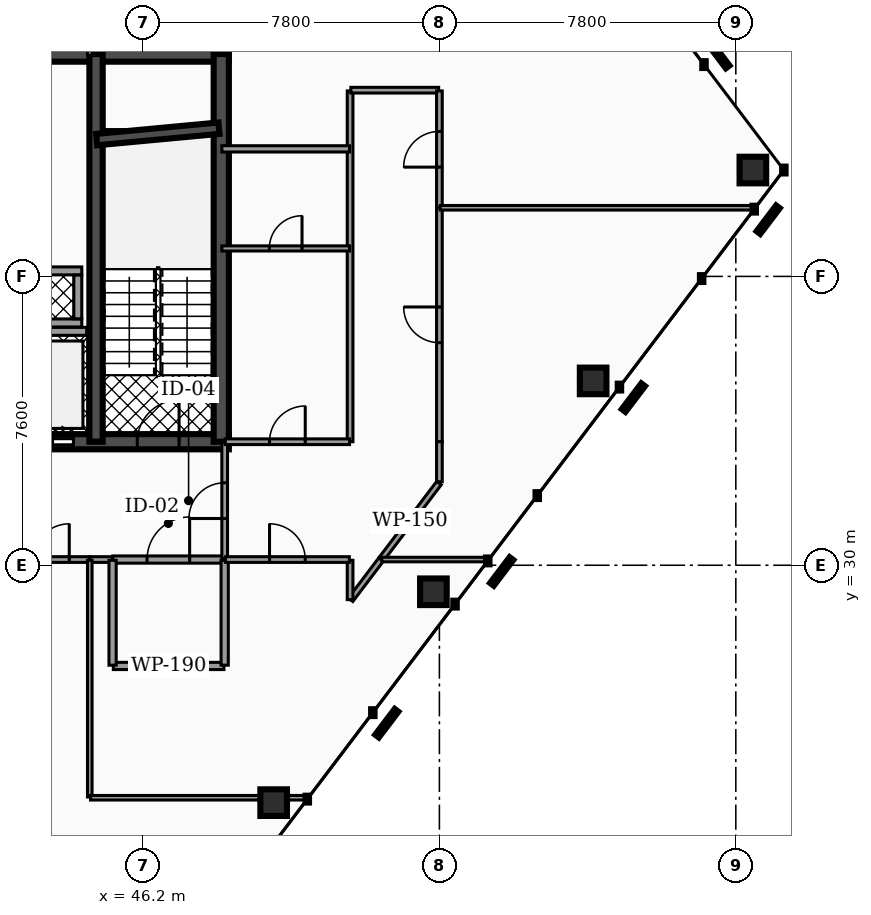
"""IFC4 building model, lengths in metres.
Left out: names, types, materials, properties, quantities, classifications, styles, units other than length and angle.
Written with IfcOpenShell. Run it as: python <this file> out.ifc"""

import sys

from ifc_helpers import new_model, si_unit, direction, frame, frame_2d, origin, origin_2d, place, context, subcontext, project, spatial, rectangle, hollow_rectangle, extrude, element, fill, save


model = new_model("IFC4")
c1 = context("Model", 3, precision=1e-05, world=origin(), true_north=direction((0.0, 1.0)))
c2 = subcontext(c1, "Body", "Model", "MODEL_VIEW")
j1 = project(units=[si_unit("LENGTHUNIT", "METRE"), si_unit("PLANEANGLEUNIT", "RADIAN")], contexts=[c1])
p1 = place(None, origin())
s1 = spatial("IfcSite", under=j1, at=p1, CompositionType="ELEMENT")
p2 = place(p1, origin())
s2 = spatial("IfcBuilding", under=s1, at=p2, CompositionType="ELEMENT")
p3 = place(p2, frame((0.0, 0.0, 179.52)))
s3 = spatial("IfcBuildingStorey", under=s2, at=p3, CompositionType="ELEMENT", Elevation=179.52)
p4 = place(p3, frame((28.4, 43.45, 0.0), z_axis=(0.0, 0.0, 1.0), x_axis=(1.0, 0.0, 0.0)))
e1 = element("IfcWall", 1, at=p4, inside=s3, PredefinedType="SHEAR", context=c2, shape_type="SweptSolid", body=[
    extrude(rectangle(XDim=20.06, YDim=0.4, at=frame_2d((10.03, 0.0))), origin(), (0.0, 0.0, 1.0), 3.5),
])
p5 = place(p3, frame((28.4, 33.25, 0.0), z_axis=(0.0, 0.0, 1.0), x_axis=(1.0, 0.0, 0.0)))
e2 = element("IfcWall", 2, at=p5, inside=s3, PredefinedType="SHEAR", context=c2, shape_type="SweptSolid", body=[
    extrude(rectangle(XDim=20.06, YDim=0.4, at=frame_2d((10.03, 0.0))), origin(), (0.0, 0.0, 1.0), 3.5),
])
p6 = place(p5, frame((4.03, 0.0, 0.0)))
e3 = element("IfcOpeningElement", 3, at=p6, cuts=e2, PredefinedType="OPENING", context=c2, shape_type="SweptSolid", body=[
    extrude(rectangle(XDim=1.1, YDim=2.15, at=frame_2d((0.55, 1.075))), frame((0.0, 0.21, 0.0), z_axis=(0.0, -1.0, 0.0), x_axis=(1.0, 0.0, 0.0)), (0.0, 0.0, 1.0), 0.42),
])
p7 = place(p5, frame((14.87, 0.0, 0.0)))
e4 = element("IfcOpeningElement", 4, at=p7, cuts=e2, PredefinedType="OPENING", context=c2, shape_type="SweptSolid", body=[
    extrude(rectangle(XDim=1.1, YDim=2.15, at=frame_2d((0.55, 1.075))), frame((0.0, 0.21, 0.0), z_axis=(0.0, -1.0, 0.0), x_axis=(1.0, 0.0, 0.0)), (0.0, 0.0, 1.0), 0.42),
])
p8 = place(p5, frame((5.95, 0.0, 0.0)))
e5 = element("IfcOpeningElement", 5, at=p8, cuts=e2, PredefinedType="OPENING", context=c2, shape_type="SweptSolid", body=[
    extrude(rectangle(XDim=1.0, YDim=2.1, at=frame_2d((0.5, 1.05))), frame((0.0, 0.21, 0.0), z_axis=(0.0, -1.0, 0.0), x_axis=(1.0, 0.0, 0.0)), (0.0, 0.0, 1.0), 0.42),
])
p9 = place(p5, frame((7.65, 0.0, 0.0)))
e6 = element("IfcOpeningElement", 6, at=p9, cuts=e2, PredefinedType="OPENING", context=c2, shape_type="SweptSolid", body=[
    extrude(rectangle(XDim=1.0, YDim=2.1, at=frame_2d((0.5, 1.05))), frame((0.0, 0.21, 0.0), z_axis=(0.0, -1.0, 0.0), x_axis=(1.0, 0.0, 0.0)), (0.0, 0.0, 1.0), 0.42),
])
p10 = place(p5, frame((1.31, 0.0, 0.0)))
e7 = element("IfcOpeningElement", 7, at=p10, cuts=e2, PredefinedType="OPENING", context=c2, shape_type="SweptSolid", body=[
    extrude(rectangle(XDim=1.1, YDim=2.2, at=frame_2d((0.55, 1.1))), frame((0.0, 0.21, 0.0), z_axis=(0.0, -1.0, 0.0), x_axis=(1.0, 0.0, 0.0)), (0.0, 0.0, 1.0), 0.42),
])
p11 = place(p5, frame((9.44, 0.0, 0.0)))
e8 = element("IfcOpeningElement", 8, at=p11, cuts=e2, PredefinedType="OPENING", context=c2, shape_type="SweptSolid", body=[
    extrude(rectangle(XDim=1.12, YDim=2.05, at=frame_2d((0.56, 1.025))), frame((0.0, 0.21, 0.0), z_axis=(0.0, -1.0, 0.0), x_axis=(1.0, 0.0, 0.0)), (0.0, 0.0, 1.0), 0.42),
])
p12 = place(p5, frame((17.65, 0.0, 0.0)))
e9 = element("IfcOpeningElement", 9, at=p12, cuts=e2, PredefinedType="OPENING", context=c2, shape_type="SweptSolid", body=[
    extrude(rectangle(XDim=1.1, YDim=2.2, at=frame_2d((0.55, 1.1))), frame((0.0, 0.21, 0.0), z_axis=(0.0, -1.0, 0.0), x_axis=(1.0, 0.0, 0.0)), (0.0, 0.0, 1.0), 0.42),
])
p13 = place(p3, frame((44.965, 33.25, 0.0), z_axis=(0.0, 0.0, 1.0), x_axis=(0.0, 1.0, 0.0)))
e10 = element("IfcWall", 10, at=p13, inside=s3, PredefinedType="SHEAR", context=c2, shape_type="SweptSolid", body=[
    extrude(rectangle(XDim=10.2, YDim=0.35, at=frame_2d((5.1, 0.0))), origin(), (0.0, 0.0, 1.0), 3.5),
])
p14 = place(p3, frame((48.26, 33.25, 0.0), z_axis=(0.0, 0.0, 1.0), x_axis=(0.0, 1.0, 0.0)))
e11 = element("IfcWall", 11, at=p14, inside=s3, PredefinedType="SHEAR", context=c2, shape_type="SweptSolid", body=[
    extrude(rectangle(XDim=10.2, YDim=0.4, at=frame_2d((5.1, 0.0))), origin(), (0.0, 0.0, 1.0), 3.5),
])
p15 = place(p3, frame((44.98, 41.2, 0.0), z_axis=(0.0, 0.0, 1.0), x_axis=(0.995686468965, 0.09278176286, 0.0)))
e12 = element("IfcWall", 12, at=p15, inside=s3, PredefinedType="SHEAR", context=c2, shape_type="SweptSolid", body=[
    extrude(rectangle(XDim=3.234, YDim=0.3, at=frame_2d((1.617, 0.0))), origin(), (0.0, 0.0, 1.0), 3.5),
])
for number, where, z_axis, x_axis in (
    (13, (49.639, 23.754, 0.0), (0.0, 0.0, 1.0), (1.0, 0.0, 0.0)),
    (14, (53.842, 29.302, 0.0), (0.0, 0.0, 1.0), (1.0, 0.0, 0.0)),
    (15, (58.045, 34.851, 0.0), (0.0, 0.0, 1.0), (1.0, 0.0, 0.0)),
    (16, (62.249, 40.399, 0.0), (0.0, 0.0, 1.0), (1.0, 0.0, 0.0)),
):
    element("IfcColumn", number, at=place(p3, frame(where, z_axis=z_axis, x_axis=x_axis)), inside=s3, PredefinedType="COLUMN", context=c2, shape_type="SweptSolid", body=[
        extrude(hollow_rectangle(XDim=0.7, YDim=0.7, WallThickness=0.035, at=origin_2d()), origin(), (0.0, 0.0, 1.0), 3.5),
    ])
p16 = place(p3, frame((42.92, 36.155, 0.0), z_axis=(0.0, 0.0, 1.0), x_axis=(1.0, 0.0, 0.0)))
e17 = element("IfcWall", 17, at=p16, inside=s3, PredefinedType="SOLIDWALL", context=c2, shape_type="SweptSolid", body=[
    extrude(rectangle(XDim=1.8, YDim=0.21, at=frame_2d((0.9, 0.0))), origin(), (0.0, 0.0, 1.0), 2.472),
])
for number, where, z_axis, x_axis in (
    (18, (42.99, 36.375, 0.0), (0.0, 0.0, 1.0), (1.0, 0.0, 0.0)),
    (19, (42.99, 37.745, 0.0), (0.0, 0.0, 1.0), (1.0, 0.0, 0.0)),
):
    element("IfcWall", number, at=place(p3, frame(where, z_axis=z_axis, x_axis=x_axis)), inside=s3, PredefinedType="SOLIDWALL", context=c2, shape_type="SweptSolid", body=[
        extrude(rectangle(XDim=1.6, YDim=0.21, at=frame_2d((0.8, 0.0))), origin(), (0.0, 0.0, 1.0), 3.5),
    ])
p17 = place(p3, frame((44.485, 36.485, 0.0), z_axis=(0.0, 0.0, 1.0), x_axis=(0.0, 1.0, 0.0)))
e20 = element("IfcWall", 20, at=p17, inside=s3, PredefinedType="SOLIDWALL", context=c2, shape_type="SweptSolid", body=[
    extrude(rectangle(XDim=1.15, YDim=0.21, at=frame_2d((0.575, 0.0))), origin(), (0.0, 0.0, 1.0), 3.5),
])
p18 = place(p3, frame((45.405, 30.15, 0.0), z_axis=(0.0, 0.0, 1.0), x_axis=(1.0, 0.0, 0.0)))
e21 = element("IfcWall", 21, at=p18, inside=s3, PredefinedType="PARTITIONING", context=c2, shape_type="SweptSolid", body=[
    extrude(rectangle(XDim=2.925, YDim=0.19, at=frame_2d((1.462, 0.0))), origin(), (0.0, 0.0, 1.0), 2.457),
])
p19 = place(p18, frame((0.903, 0.0, 0.0)))
e22 = element("IfcOpeningElement", 22, at=p19, cuts=e21, PredefinedType="OPENING", context=c2, shape_type="SweptSolid", body=[
    extrude(rectangle(XDim=1.12, YDim=2.05, at=frame_2d((0.56, 1.025))), frame((0.0, 0.105, 0.0), z_axis=(0.0, -1.0, 0.0), x_axis=(1.0, 0.0, 0.0)), (0.0, 0.0, 1.0), 0.21),
])
p20 = place(p3, frame((48.35, 30.17, 0.0), z_axis=(0.0, 0.0, 1.0), x_axis=(0.0, 1.0, 0.0)))
e23 = element("IfcWall", 23, at=p20, inside=s3, PredefinedType="PARTITIONING", context=c2, shape_type="SweptSolid", body=[
    extrude(rectangle(XDim=3.06, YDim=0.15, at=frame_2d((1.53, 0.0))), origin(), (0.0, 0.0, 1.0), 2.457),
])
p21 = place(p20, frame((1.06, 0.0, 0.0)))
e24 = element("IfcOpeningElement", 24, at=p21, cuts=e23, PredefinedType="OPENING", context=c2, shape_type="SweptSolid", body=[
    extrude(rectangle(XDim=0.94, YDim=2.05, at=frame_2d((0.47, 1.025))), frame((0.0, 0.085, 0.0), z_axis=(0.0, -1.0, 0.0), x_axis=(1.0, 0.0, 0.0)), (0.0, 0.0, 1.0), 0.17),
])
p22 = place(p3, frame((35.985, 30.15, 0.0), z_axis=(0.0, 0.0, 1.0), x_axis=(1.0, 0.0, 0.0)))
e25 = element("IfcWall", 25, at=p22, inside=s3, PredefinedType="PARTITIONING", context=c2, shape_type="SweptSolid", body=[
    extrude(rectangle(XDim=8.81, YDim=0.15, at=frame_2d((4.405, 0.0))), origin(), (0.0, 0.0, 1.0), 2.457),
])
p23 = place(p22, frame((7.335, 0.0, 0.0)))
e26 = element("IfcOpeningElement", 26, at=p23, cuts=e25, PredefinedType="OPENING", context=c2, shape_type="SweptSolid", body=[
    extrude(rectangle(XDim=0.94, YDim=2.05, at=frame_2d((0.47, 1.025))), frame((0.0, 0.085, 0.0), z_axis=(0.0, -1.0, 0.0), x_axis=(1.0, 0.0, 0.0)), (0.0, 0.0, 1.0), 0.17),
])
p24 = place(p3, frame((44.805, 30.15, 0.0), z_axis=(0.0, 0.0, 1.0), x_axis=(1.0, 0.0, 0.0)))
e27 = element("IfcWall", 27, at=p24, inside=s3, PredefinedType="PARTITIONING", context=c2, shape_type="SweptSolid", body=[
    extrude(rectangle(XDim=0.59, YDim=0.15, at=frame_2d((0.295, 0.0))), origin(), (0.0, 0.0, 1.0), 2.457),
])
p25 = place(p3, frame((45.42, 27.35, 0.0), z_axis=(0.0, 0.0, 1.0), x_axis=(1.0, 0.0, 0.0)))
e28 = element("IfcWall", 28, at=p25, inside=s3, PredefinedType="PARTITIONING", context=c2, shape_type="SweptSolid", body=[
    extrude(rectangle(XDim=2.91, YDim=0.19, at=frame_2d((1.455, 0.0))), origin(), (0.0, 0.0, 1.0), 2.457),
])
for number, where, z_axis, x_axis in (
    (29, (45.4, 27.37, 0.0), (0.0, 0.0, 1.0), (0.0, 1.0, 0.0)),
    (30, (48.35, 27.37, 0.0), (0.0, 0.0, 1.0), (0.0, 1.0, 0.0)),
):
    element("IfcWall", number, at=place(p3, frame(where, z_axis=z_axis, x_axis=x_axis)), inside=s3, PredefinedType="PARTITIONING", context=c2, shape_type="SweptSolid", body=[
        extrude(rectangle(XDim=2.76, YDim=0.19, at=frame_2d((1.38, 0.0))), origin(), (0.0, 0.0, 1.0), 2.457),
    ])
p26 = place(p3, frame((51.662, 29.091, 0.0), z_axis=(0.0, 0.0, 1.0), x_axis=(0.603847067363, 0.797100193976, 0.0)))
e31 = element("IfcWall", 31, at=p26, inside=s3, PredefinedType="PARTITIONING", context=c2, shape_type="SweptSolid", body=[
    extrude(rectangle(XDim=1.328, YDim=0.15, at=frame_2d((0.664, 0.0))), origin(), (0.0, 0.0, 1.0), 2.457),
])
p27 = place(p3, frame((51.65, 29.095, 0.0), z_axis=(0.0, 0.0, 1.0), x_axis=(0.0, 1.0, 0.0)))
e32 = element("IfcWall", 32, at=p27, inside=s3, PredefinedType="PARTITIONING", context=c2, shape_type="SweptSolid", body=[
    extrude(rectangle(XDim=1.035, YDim=0.15, at=frame_2d((0.518, 0.0))), origin(), (0.0, 0.0, 1.0), 2.457),
])
p28 = place(p3, frame((48.37, 30.15, 0.0), z_axis=(0.0, 0.0, 1.0), x_axis=(1.0, 0.0, 0.0)))
e33 = element("IfcWall", 33, at=p28, inside=s3, PredefinedType="PARTITIONING", context=c2, shape_type="SweptSolid", body=[
    extrude(rectangle(XDim=3.26, YDim=0.15, at=frame_2d((1.63, 0.0))), origin(), (0.0, 0.0, 1.0), 2.457),
])
p29 = place(p28, frame((1.16, 0.0, 0.0)))
e34 = element("IfcOpeningElement", 34, at=p29, cuts=e33, PredefinedType="OPENING", context=c2, shape_type="SweptSolid", body=[
    extrude(rectangle(XDim=0.94, YDim=2.05, at=frame_2d((0.47, 1.025))), frame((0.0, 0.085, 0.0), z_axis=(0.0, -1.0, 0.0), x_axis=(1.0, 0.0, 0.0)), (0.0, 0.0, 1.0), 0.17),
])
p30 = place(p3, frame((54.0, 33.25, 0.0), z_axis=(0.0, 0.0, 1.0), x_axis=(0.0, 1.0, 0.0)))
e35 = element("IfcWall", 35, at=p30, inside=s3, PredefinedType="PARTITIONING", context=c2, shape_type="SweptSolid", body=[
    extrude(rectangle(XDim=6.151, YDim=0.15, at=frame_2d((3.076, 0.0))), origin(), (0.0, 0.0, 1.0), 2.457),
])
p31 = place(p30, frame((2.606, 0.0, 0.0)))
e36 = element("IfcOpeningElement", 36, at=p31, cuts=e35, PredefinedType="OPENING", context=c2, shape_type="SweptSolid", body=[
    extrude(rectangle(XDim=0.94, YDim=2.05, at=frame_2d((0.47, 1.025))), frame((0.0, 0.085, 0.0), z_axis=(0.0, -1.0, 0.0), x_axis=(1.0, 0.0, 0.0)), (0.0, 0.0, 1.0), 0.17),
])
p32 = place(p3, frame((54.0, 32.197, 0.0), z_axis=(0.0, 0.0, 1.0), x_axis=(0.0, 1.0, 0.0)))
e37 = element("IfcWall", 37, at=p32, inside=s3, PredefinedType="PARTITIONING", context=c2, shape_type="SweptSolid", body=[
    extrude(rectangle(XDim=1.053, YDim=0.15, at=frame_2d((0.527, 0.0))), origin(), (0.0, 0.0, 1.0), 2.457),
])
p33 = place(p3, frame((52.468, 30.154, 0.0), z_axis=(0.0, 0.0, 1.0), x_axis=(0.603840884766, 0.797104877594, 0.0)))
e38 = element("IfcWall", 38, at=p33, inside=s3, PredefinedType="PARTITIONING", context=c2, shape_type="SweptSolid", body=[
    extrude(rectangle(XDim=2.518, YDim=0.15, at=frame_2d((1.259, 0.0))), origin(), (0.0, 0.0, 1.0), 2.457),
])
p34 = place(p3, frame((51.65, 33.25, 0.0), z_axis=(0.0, 0.0, 1.0), x_axis=(0.0, 1.0, 0.0)))
e39 = element("IfcWall", 39, at=p34, inside=s3, PredefinedType="PARTITIONING", context=c2, shape_type="SweptSolid", body=[
    extrude(rectangle(XDim=9.23, YDim=0.15, at=frame_2d((4.615, 0.0))), origin(), (0.0, 0.0, 1.0), 2.457),
])
p35 = place(p3, frame((51.67, 42.5, 0.0), z_axis=(0.0, 0.0, 1.0), x_axis=(1.0, 0.0, 0.0)))
e40 = element("IfcWall", 40, at=p35, inside=s3, PredefinedType="PARTITIONING", context=c2, shape_type="SweptSolid", body=[
    extrude(rectangle(XDim=2.31, YDim=0.15, at=frame_2d((1.155, 0.0))), origin(), (0.0, 0.0, 1.0), 2.457),
])
p36 = place(p3, frame((54.0, 39.411, 0.0), z_axis=(0.0, 0.0, 1.0), x_axis=(0.0, 1.0, 0.0)))
e41 = element("IfcWall", 41, at=p36, inside=s3, PredefinedType="PARTITIONING", context=c2, shape_type="SweptSolid", body=[
    extrude(rectangle(XDim=3.069, YDim=0.15, at=frame_2d((1.534, 0.0))), origin(), (0.0, 0.0, 1.0), 2.457),
])
p37 = place(p36, frame((1.064, 0.0, 0.0)))
e42 = element("IfcOpeningElement", 42, at=p37, cuts=e41, PredefinedType="OPENING", context=c2, shape_type="SweptSolid", body=[
    extrude(rectangle(XDim=0.94, YDim=2.05, at=frame_2d((0.47, 1.025))), frame((0.0, 0.085, 0.0), z_axis=(0.0, -1.0, 0.0), x_axis=(1.0, 0.0, 0.0)), (0.0, 0.0, 1.0), 0.17),
])
p38 = place(p3, frame((48.365, 33.25, 0.0), z_axis=(0.0, 0.0, 1.0), x_axis=(1.0, 0.0, 0.0)))
e43 = element("IfcWall", 43, at=p38, inside=s3, PredefinedType="PARTITIONING", context=c2, shape_type="SweptSolid", body=[
    extrude(rectangle(XDim=3.27, YDim=0.15, at=frame_2d((1.635, 0.0))), origin(), (0.0, 0.0, 1.0), 2.457),
])
p39 = place(p38, frame((1.165, 0.0, 0.0)))
e44 = element("IfcOpeningElement", 44, at=p39, cuts=e43, PredefinedType="OPENING", context=c2, shape_type="SweptSolid", body=[
    extrude(rectangle(XDim=0.94, YDim=2.05, at=frame_2d((0.47, 1.025))), frame((0.0, 0.085, 0.0), z_axis=(0.0, -1.0, 0.0), x_axis=(1.0, 0.0, 0.0)), (0.0, 0.0, 1.0), 0.17),
])
p40 = place(p3, frame((44.8, 23.903, 0.0), z_axis=(0.0, 0.0, 1.0), x_axis=(0.0, 1.0, 0.0)))
e45 = element("IfcWall", 45, at=p40, inside=s3, PredefinedType="PARTITIONING", context=c2, shape_type="SweptSolid", body=[
    extrude(rectangle(XDim=6.227, YDim=0.12, at=frame_2d((3.114, 0.0))), origin(), (0.0, 0.0, 1.0), 2.457),
])
p41 = place(p3, frame((44.82, 23.883, 0.0), z_axis=(0.0, 0.0, 1.0), x_axis=(1.0, 0.0, 0.0)))
e46 = element("IfcWall", 46, at=p41, inside=s3, PredefinedType="PARTITIONING", context=c2, shape_type="SweptSolid", body=[
    extrude(rectangle(XDim=5.717, YDim=0.12, at=frame_2d((2.858, 0.0))), origin(), (0.0, 0.0, 1.0), 2.457),
])
p42 = place(p3, frame((44.8, 43.415, 0.0), z_axis=(0.0, 0.0, 1.0), x_axis=(0.0, 1.0, 0.0)))
e47 = element("IfcWall", 47, at=p42, inside=s3, PredefinedType="PARTITIONING", context=c2, shape_type="SweptSolid", body=[
    extrude(rectangle(XDim=3.092, YDim=0.12, at=frame_2d((1.546, 0.0))), origin(), (0.0, 0.0, 1.0), 2.457),
])
p43 = place(p3, frame((52.485, 30.15, 0.0), z_axis=(0.0, 0.0, 1.0), x_axis=(1.0, 0.0, 0.0)))
e48 = element("IfcWall", 48, at=p43, inside=s3, PredefinedType="PARTITIONING", context=c2, shape_type="SweptSolid", body=[
    extrude(rectangle(XDim=2.8, YDim=0.12, at=frame_2d((1.4, 0.0))), origin(), (0.0, 0.0, 1.0), 2.457),
])
p44 = place(p3, frame((54.02, 39.406, 0.0), z_axis=(0.0, 0.0, 1.0), x_axis=(1.0, 0.0, 0.0)))
e49 = element("IfcWall", 49, at=p44, inside=s3, PredefinedType="PARTITIONING", context=c2, shape_type="SweptSolid", body=[
    extrude(rectangle(XDim=8.277, YDim=0.12, at=frame_2d((4.139, 0.0))), origin(), (0.0, 0.0, 1.0), 2.457),
])
p45 = place(p3, frame((48.275, 40.956, 0.0), z_axis=(0.0, 0.0, 1.0), x_axis=(1.0, 0.0, 0.0)))
e50 = element("IfcWall", 50, at=p45, inside=s3, PredefinedType="PARTITIONING", context=c2, shape_type="SweptSolid", body=[
    extrude(rectangle(XDim=3.36, YDim=0.165, at=frame_2d((1.68, 0.0))), origin(), (0.0, 0.0, 1.0), 2.457),
])
p46 = place(p3, frame((48.275, 38.336, 0.0), z_axis=(0.0, 0.0, 1.0), x_axis=(1.0, 0.0, 0.0)))
e51 = element("IfcWall", 51, at=p46, inside=s3, PredefinedType="PARTITIONING", context=c2, shape_type="SweptSolid", body=[
    extrude(rectangle(XDim=3.36, YDim=0.135, at=frame_2d((1.68, 0.0))), origin(), (0.0, 0.0, 1.0), 2.457),
])
p47 = place(p46, frame((1.25, 0.0, 0.0)))
e52 = element("IfcOpeningElement", 52, at=p47, cuts=e51, PredefinedType="OPENING", context=c2, shape_type="SweptSolid", body=[
    extrude(rectangle(XDim=0.86, YDim=2.05, at=frame_2d((0.43, 1.025))), frame((0.0, 0.077, 0.0), z_axis=(0.0, -1.0, 0.0), x_axis=(1.0, 0.0, 0.0)), (0.0, 0.0, 1.0), 0.155),
])
p48 = place(p7, origin())
e53 = element("IfcDoor", 53, at=p48, inside=s3, OperationType="SLIDING_TO_RIGHT", PredefinedType="DOOR", context=c2, shape_type="SweptSolid", body=[
    extrude(rectangle(XDim=1.1, YDim=2.15, at=frame_2d((0.55, 1.075))), frame((0.0, 0.025, 0.0), z_axis=(0.0, -1.0, 0.0), x_axis=(1.0, 0.0, 0.0)), (0.0, 0.0, 1.0), 0.05),
])
fill(e4, e53)
p49 = place(p12, origin())
e54 = element("IfcDoor", 54, at=p49, inside=s3, OperationType="SINGLE_SWING_RIGHT", PredefinedType="DOOR", context=c2, shape_type="SweptSolid", body=[
    extrude(rectangle(XDim=1.1, YDim=2.2, at=frame_2d((0.55, 1.1))), frame((0.0, 0.025, 0.0), z_axis=(0.0, -1.0, 0.0), x_axis=(1.0, 0.0, 0.0)), (0.0, 0.0, 1.0), 0.05),
])
fill(e9, e54)
p50 = place(p19, origin())
e55 = element("IfcDoor", 55, at=p50, inside=s3, OperationType="SINGLE_SWING_RIGHT", PredefinedType="DOOR", context=c2, shape_type="SweptSolid", body=[
    extrude(rectangle(XDim=1.12, YDim=2.05, at=frame_2d((0.56, 1.025))), frame((0.0, 0.025, 0.0), z_axis=(0.0, -1.0, 0.0), x_axis=(1.0, 0.0, 0.0)), (0.0, 0.0, 1.0), 0.05),
])
fill(e22, e55)
p51 = place(p21, origin())
e56 = element("IfcDoor", 56, at=p51, inside=s3, OperationType="SINGLE_SWING_LEFT", PredefinedType="DOOR", context=c2, shape_type="SweptSolid", body=[
    extrude(rectangle(XDim=0.94, YDim=2.05, at=frame_2d((0.47, 1.025))), frame((0.0, 0.025, 0.0), z_axis=(0.0, -1.0, 0.0), x_axis=(1.0, 0.0, 0.0)), (0.0, 0.0, 1.0), 0.05),
])
fill(e24, e56)
p52 = place(p23, origin())
e57 = element("IfcDoor", 57, at=p52, inside=s3, OperationType="SINGLE_SWING_RIGHT", PredefinedType="DOOR", context=c2, shape_type="SweptSolid", body=[
    extrude(rectangle(XDim=0.94, YDim=2.05, at=frame_2d((0.47, 1.025))), frame((0.0, 0.025, 0.0), z_axis=(0.0, -1.0, 0.0), x_axis=(1.0, 0.0, 0.0)), (0.0, 0.0, 1.0), 0.05),
])
fill(e26, e57)
p53 = place(p29, origin())
e58 = element("IfcDoor", 58, at=p53, inside=s3, OperationType="SINGLE_SWING_LEFT", PredefinedType="DOOR", context=c2, shape_type="SweptSolid", body=[
    extrude(rectangle(XDim=0.94, YDim=2.05, at=frame_2d((0.47, 1.025))), frame((0.0, 0.025, 0.0), z_axis=(0.0, -1.0, 0.0), x_axis=(1.0, 0.0, 0.0)), (0.0, 0.0, 1.0), 0.05),
])
fill(e34, e58)
p54 = place(p31, origin())
e59 = element("IfcDoor", 59, at=p54, inside=s3, OperationType="SINGLE_SWING_RIGHT", PredefinedType="DOOR", context=c2, shape_type="SweptSolid", body=[
    extrude(rectangle(XDim=0.94, YDim=2.05, at=frame_2d((0.47, 1.025))), frame((0.0, 0.025, 0.0), z_axis=(0.0, -1.0, 0.0), x_axis=(1.0, 0.0, 0.0)), (0.0, 0.0, 1.0), 0.05),
])
fill(e36, e59)
p55 = place(p37, origin())
e60 = element("IfcDoor", 60, at=p55, inside=s3, OperationType="SINGLE_SWING_LEFT", PredefinedType="DOOR", context=c2, shape_type="SweptSolid", body=[
    extrude(rectangle(XDim=0.94, YDim=2.05, at=frame_2d((0.47, 1.025))), frame((0.0, 0.025, 0.0), z_axis=(0.0, -1.0, 0.0), x_axis=(1.0, 0.0, 0.0)), (0.0, 0.0, 1.0), 0.05),
])
fill(e42, e60)
p56 = place(p39, origin())
e61 = element("IfcDoor", 61, at=p56, inside=s3, OperationType="SINGLE_SWING_RIGHT", PredefinedType="DOOR", context=c2, shape_type="SweptSolid", body=[
    extrude(rectangle(XDim=0.94, YDim=2.05, at=frame_2d((0.47, 1.025))), frame((0.0, 0.025, 0.0), z_axis=(0.0, -1.0, 0.0), x_axis=(1.0, 0.0, 0.0)), (0.0, 0.0, 1.0), 0.05),
])
fill(e44, e61)
p57 = place(p47, origin())
e62 = element("IfcDoor", 62, at=p57, inside=s3, OperationType="SINGLE_SWING_RIGHT", PredefinedType="DOOR", context=c2, shape_type="SweptSolid", body=[
    extrude(rectangle(XDim=0.86, YDim=2.05, at=frame_2d((0.43, 1.025))), frame((0.0, 0.025, 0.0), z_axis=(0.0, -1.0, 0.0), x_axis=(1.0, 0.0, 0.0)), (0.0, 0.0, 1.0), 0.05),
])
fill(e52, e62)
save(model, sys.argv[1])
